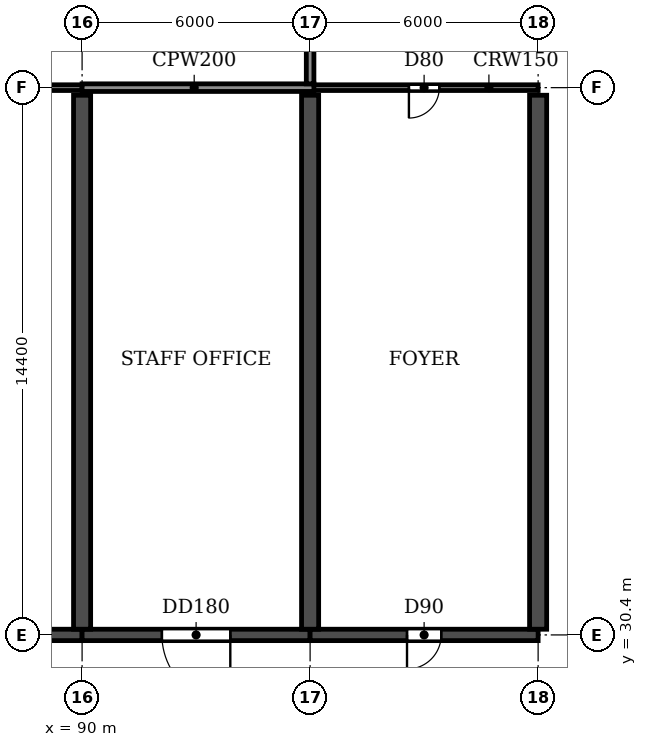
"""IFC4 building model, lengths in metres.
Left out: names, types, materials, properties, quantities, classifications, styles, units other than length and angle.
Written with IfcOpenShell. Run it as: python <this file> out.ifc"""

import sys

from ifc_helpers import new_model, si_unit, direction, frame, frame_2d, origin, place, context, subcontext, project, spatial, rectangle, extrude, element, fill, save


model = new_model("IFC4")
c1 = context("Model", 3, precision=1e-05, world=origin(), true_north=direction((0.0, 1.0)))
c2 = subcontext(c1, "Body", "Model", "MODEL_VIEW")
j1 = project(units=[si_unit("LENGTHUNIT", "METRE"), si_unit("PLANEANGLEUNIT", "RADIAN")], contexts=[c1])
p1 = place(None, origin())
s1 = spatial("IfcSite", under=j1, at=p1, CompositionType="ELEMENT")
p2 = place(p1, origin())
s2 = spatial("IfcBuilding", under=s1, at=p2, CompositionType="ELEMENT")
p3 = place(p2, frame((0.0, 0.0, 6.0)))
s3 = spatial("IfcBuildingStorey", under=s2, at=p3, CompositionType="ELEMENT", Elevation=6.0)
for number, where, z_axis, x_axis in (
    (1, (90.0, 30.55, 0.0), (0.0, 0.0, 1.0), (0.0, 1.0, 0.0)),
    (2, (96.0, 30.55, 0.0), (0.0, 0.0, 1.0), (0.0, 1.0, 0.0)),
    (3, (102.0, 30.55, 0.0), (0.0, 0.0, 1.0), (0.0, 1.0, 0.0)),
):
    element("IfcWall", number, at=place(p3, frame(where, z_axis=z_axis, x_axis=x_axis)), inside=s3, PredefinedType="SHEAR", context=c2, shape_type="SweptSolid", body=[
        extrude(rectangle(XDim=14.05, YDim=0.45, at=frame_2d((7.025, 0.0))), origin(), (0.0, 0.0, 1.0), 4.52),
    ])
p4 = place(p3, frame((84.0, 30.4, 0.0), z_axis=(0.0, 0.0, 1.0), x_axis=(1.0, 0.0, 0.0)))
e4 = element("IfcWall", 4, at=p4, inside=s3, PredefinedType="SHEAR", context=c2, shape_type="SweptSolid", body=[
    extrude(rectangle(XDim=6.0, YDim=0.3, at=frame_2d((3.0, 0.0))), origin(), (0.0, 0.0, 1.0), 3.92),
])
p5 = place(p4, frame((2.55, 0.0, 0.0)))
e5 = element("IfcOpeningElement", 5, at=p5, cuts=e4, PredefinedType="OPENING", context=c2, shape_type="SweptSolid", body=[
    extrude(rectangle(XDim=0.9, YDim=2.1, at=frame_2d((0.45, 1.05))), frame((0.0, 0.16, 0.0), z_axis=(0.0, -1.0, 0.0), x_axis=(1.0, 0.0, 0.0)), (0.0, 0.0, 1.0), 0.32),
])
p6 = place(p3, frame((90.0, 30.4, 0.0), z_axis=(0.0, 0.0, 1.0), x_axis=(1.0, 0.0, 0.0)))
e6 = element("IfcWall", 6, at=p6, inside=s3, PredefinedType="SHEAR", context=c2, shape_type="SweptSolid", body=[
    extrude(rectangle(XDim=6.0, YDim=0.3, at=frame_2d((3.0, 0.0))), origin(), (0.0, 0.0, 1.0), 3.92),
])
p7 = place(p6, frame((2.1, 0.0, 0.0)))
e7 = element("IfcOpeningElement", 7, at=p7, cuts=e6, PredefinedType="OPENING", context=c2, shape_type="SweptSolid", body=[
    extrude(rectangle(XDim=1.8, YDim=2.1, at=frame_2d((0.9, 1.05))), frame((0.0, 0.16, 0.0), z_axis=(0.0, -1.0, 0.0), x_axis=(1.0, 0.0, 0.0)), (0.0, 0.0, 1.0), 0.32),
])
p8 = place(p3, frame((96.0, 30.4, 0.0), z_axis=(0.0, 0.0, 1.0), x_axis=(1.0, 0.0, 0.0)))
e8 = element("IfcWall", 8, at=p8, inside=s3, PredefinedType="SHEAR", context=c2, shape_type="SweptSolid", body=[
    extrude(rectangle(XDim=6.0, YDim=0.3, at=frame_2d((3.0, 0.0))), origin(), (0.0, 0.0, 1.0), 3.92),
])
p9 = place(p8, frame((2.55, 0.0, 0.0)))
e9 = element("IfcOpeningElement", 9, at=p9, cuts=e8, PredefinedType="OPENING", context=c2, shape_type="SweptSolid", body=[
    extrude(rectangle(XDim=0.9, YDim=2.1, at=frame_2d((0.45, 1.05))), frame((0.0, 0.16, 0.0), z_axis=(0.0, -1.0, 0.0), x_axis=(1.0, 0.0, 0.0)), (0.0, 0.0, 1.0), 0.32),
])
p10 = place(p3, frame((84.0, 44.8, 0.0), z_axis=(0.0, 0.0, 1.0), x_axis=(1.0, 0.0, 0.0)))
e10 = element("IfcWall", 10, at=p10, inside=s3, PredefinedType="PARTITIONING", context=c2, shape_type="SweptSolid", body=[
    extrude(rectangle(XDim=6.0, YDim=0.15, at=frame_2d((3.0, 0.0))), origin(), (0.0, 0.0, 1.0), 4.52),
])
p11 = place(p10, frame((2.1, 0.0, 0.0)))
e11 = element("IfcOpeningElement", 11, at=p11, cuts=e10, PredefinedType="OPENING", context=c2, shape_type="SweptSolid", body=[
    extrude(rectangle(XDim=1.8, YDim=2.1, at=frame_2d((0.9, 1.05))), frame((0.0, 0.085, 0.0), z_axis=(0.0, -1.0, 0.0), x_axis=(1.0, 0.0, 0.0)), (0.0, 0.0, 1.0), 0.17),
])
p12 = place(p3, frame((95.9, 44.8, 0.0), z_axis=(0.0, 0.0, 1.0), x_axis=(1.0, 0.0, 0.0)))
e12 = element("IfcWall", 12, at=p12, inside=s3, PredefinedType="PARTITIONING", context=c2, shape_type="SweptSolid", body=[
    extrude(rectangle(XDim=6.1, YDim=0.15, at=frame_2d((3.05, 0.0))), origin(), (0.0, 0.0, 1.0), 4.52),
])
p13 = place(p12, frame((2.7, 0.0, 0.0)))
e13 = element("IfcOpeningElement", 13, at=p13, cuts=e12, PredefinedType="OPENING", context=c2, shape_type="SweptSolid", body=[
    extrude(rectangle(XDim=0.8, YDim=2.1, at=frame_2d((0.4, 1.05))), frame((0.0, 0.085, 0.0), z_axis=(0.0, -1.0, 0.0), x_axis=(1.0, 0.0, 0.0)), (0.0, 0.0, 1.0), 0.17),
])
p14 = place(p3, frame((90.0, 44.8, 0.0), z_axis=(0.0, 0.0, 1.0), x_axis=(1.0, 0.0, 0.0)))
e14 = element("IfcWall", 14, at=p14, inside=s3, PredefinedType="PARTITIONING", context=c2, shape_type="SweptSolid", body=[
    extrude(rectangle(XDim=6.1, YDim=0.2, at=frame_2d((3.05, 0.0))), origin(), (0.0, 0.0, 1.0), 4.52),
])
p15 = place(p3, frame((96.0, 44.9, 0.0), z_axis=(0.0, 0.0, 1.0), x_axis=(0.0, 1.0, 0.0)))
e15 = element("IfcWall", 15, at=p15, inside=s3, PredefinedType="PARTITIONING", context=c2, shape_type="SweptSolid", body=[
    extrude(rectangle(XDim=23.84, YDim=0.2, at=frame_2d((11.92, 0.0))), origin(), (0.0, 0.0, 1.0), 4.52),
])
p16 = place(p7, frame((1.8, 0.0, 0.0), z_axis=(0.0, 0.0, 1.0), x_axis=(-1.0, 0.0, 0.0)))
e16 = element("IfcDoor", 16, at=p16, inside=s3, OperationType="DOUBLE_DOOR_SINGLE_SWING", PredefinedType="DOOR", context=c2, shape_type="SweptSolid", body=[
    extrude(rectangle(XDim=1.8, YDim=2.1, at=frame_2d((0.9, 1.05))), frame((0.0, 0.025, 0.0), z_axis=(0.0, -1.0, 0.0), x_axis=(1.0, 0.0, 0.0)), (0.0, 0.0, 1.0), 0.05),
])
fill(e7, e16)
p17 = place(p9, frame((0.9, 0.0, 0.0), z_axis=(0.0, 0.0, 1.0), x_axis=(-1.0, 0.0, 0.0)))
e17 = element("IfcDoor", 17, at=p17, inside=s3, OperationType="SINGLE_SWING_RIGHT", PredefinedType="DOOR", context=c2, shape_type="SweptSolid", body=[
    extrude(rectangle(XDim=0.9, YDim=2.1, at=frame_2d((0.45, 1.05))), frame((0.0, 0.025, 0.0), z_axis=(0.0, -1.0, 0.0), x_axis=(1.0, 0.0, 0.0)), (0.0, 0.0, 1.0), 0.05),
])
fill(e9, e17)
p18 = place(p13, frame((0.8, 0.0, 0.0), z_axis=(0.0, 0.0, 1.0), x_axis=(-1.0, 0.0, 0.0)))
e18 = element("IfcDoor", 18, at=p18, inside=s3, OperationType="SINGLE_SWING_RIGHT", PredefinedType="DOOR", context=c2, shape_type="SweptSolid", body=[
    extrude(rectangle(XDim=0.8, YDim=2.1, at=frame_2d((0.4, 1.05))), frame((0.0, 0.025, 0.0), z_axis=(0.0, -1.0, 0.0), x_axis=(1.0, 0.0, 0.0)), (0.0, 0.0, 1.0), 0.05),
])
fill(e13, e18)
save(model, sys.argv[1])
